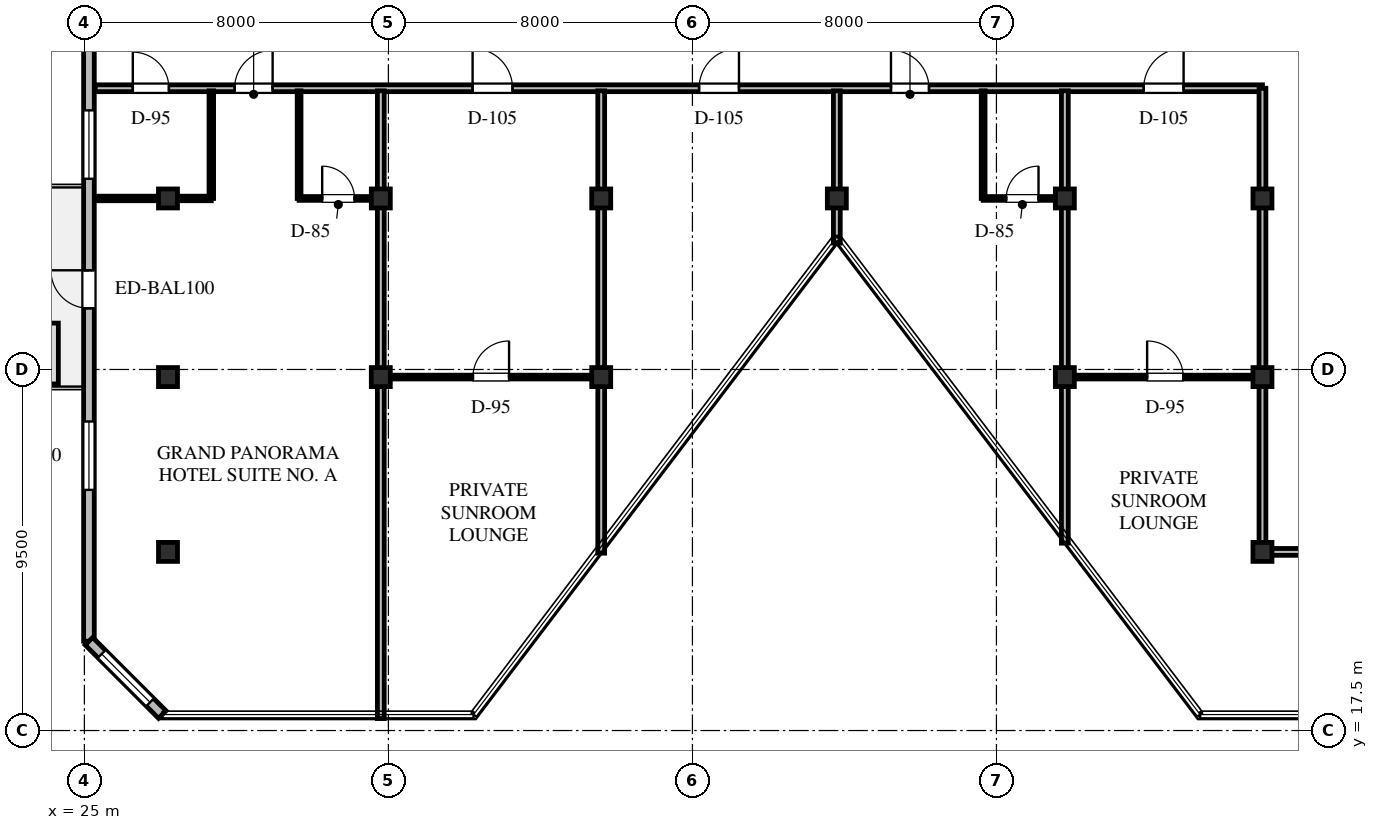
"""IFC4 building model, lengths in metres.
Left out: names, types, materials, properties, quantities, classifications, styles, units other than length and angle.
Written with IfcOpenShell. Run it as: python <this file> out.ifc"""

import sys

from ifc_helpers import new_model, si_unit, direction, frame, frame_2d, origin, origin_2d, place, context, subcontext, project, spatial, rectangle, hollow_rectangle, extrude, element, fill, save


model = new_model("IFC4")
c1 = context("Model", 3, precision=1e-05, world=origin(), true_north=direction((0.0, 1.0)))
c2 = subcontext(c1, "Body", "Model", "MODEL_VIEW")
j1 = project(units=[si_unit("LENGTHUNIT", "METRE"), si_unit("PLANEANGLEUNIT", "RADIAN")], contexts=[c1])
p1 = place(None, origin())
s1 = spatial("IfcSite", under=j1, at=p1, CompositionType="ELEMENT")
p2 = place(p1, origin())
s2 = spatial("IfcBuilding", under=s1, at=p2, CompositionType="ELEMENT")
p3 = place(p2, frame((0.0, 0.0, 256.2)))
s3 = spatial("IfcBuildingStorey", under=s2, at=p3, CompositionType="ELEMENT", Elevation=256.2)
for number, where, z_axis, x_axis in (
    (1, (44.8, 31.5, 0.0), (0.0, 0.0, 1.0), (1.0, 0.0, 0.0)),
    (2, (50.8, 31.5, 0.0), (0.0, 0.0, 1.0), (1.0, 0.0, 0.0)),
    (3, (56.0, 31.5, 0.0), (0.0, 0.0, 1.0), (1.0, 0.0, 0.0)),
    (4, (38.6, 31.5, 0.0), (0.0, 0.0, 1.0), (1.0, 0.0, 0.0)),
    (5, (32.8, 31.5, 0.0), (0.0, 0.0, 1.0), (1.0, 0.0, 0.0)),
    (6, (27.2, 31.5, 0.0), (0.0, 0.0, 1.0), (1.0, 0.0, 0.0)),
    (7, (38.6, 26.8, 0.0), (0.0, 0.0, 1.0), (1.0, 0.0, 0.0)),
    (8, (50.8, 26.8, 0.0), (0.0, 0.0, 1.0), (1.0, 0.0, 0.0)),
    (9, (56.0, 26.8, 0.0), (0.0, 0.0, 1.0), (1.0, 0.0, 0.0)),
    (10, (56.0, 22.2, 0.0), (0.0, 0.0, 1.0), (1.0, 0.0, 0.0)),
    (11, (27.2, 22.2, 0.0), (0.0, 0.0, 1.0), (1.0, 0.0, 0.0)),
    (12, (27.2, 26.8, 0.0), (0.0, 0.0, 1.0), (1.0, 0.0, 0.0)),
    (13, (32.8, 26.8, 0.0), (0.0, 0.0, 1.0), (1.0, 0.0, 0.0)),
):
    element("IfcColumn", number, at=place(p3, frame(where, z_axis=z_axis, x_axis=x_axis)), inside=s3, PredefinedType="COLUMN", context=c2, shape_type="SweptSolid", body=[
        extrude(hollow_rectangle(XDim=0.5, YDim=0.5, WallThickness=0.02, at=origin_2d()), origin(), (0.0, 0.0, 1.0), 3.6),
    ])
p4 = place(p3, frame((25.12, 19.85, 0.0), z_axis=(0.0, 0.0, 1.0), x_axis=(0.0, 1.0, 0.0)))
e14 = element("IfcWall", 14, at=p4, inside=s3, PredefinedType="STANDARD", context=c2, shape_type="SweptSolid", body=[
    extrude(rectangle(XDim=17.95, YDim=0.28, at=frame_2d((8.975, 0.0))), origin(), (0.0, 0.0, 1.0), 3.36),
])
p5 = place(p4, frame((8.76, 0.0, 0.0)))
e15 = element("IfcOpeningElement", 15, at=p5, cuts=e14, PredefinedType="OPENING", context=c2, shape_type="SweptSolid", body=[
    extrude(rectangle(XDim=1.0, YDim=2.15, at=frame_2d((0.5, 1.075))), frame((0.0, 0.15, 0.0), z_axis=(0.0, -1.0, 0.0), x_axis=(1.0, 0.0, 0.0)), (0.0, 0.0, 1.0), 0.3),
])
p6 = place(p4, frame((3.982, 0.0, 0.65)))
e16 = element("IfcOpeningElement", 16, at=p6, cuts=e14, PredefinedType="OPENING", context=c2, shape_type="SweptSolid", body=[
    extrude(rectangle(XDim=1.8, YDim=2.1, at=frame_2d((0.9, 1.05))), frame((0.0, 0.15, 0.0), z_axis=(0.0, -1.0, 0.0), x_axis=(1.0, 0.0, 0.0)), (0.0, 0.0, 1.0), 0.3),
])
p7 = place(p4, frame((12.168, 0.0, 0.65)))
e17 = element("IfcOpeningElement", 17, at=p7, cuts=e14, PredefinedType="OPENING", context=c2, shape_type="SweptSolid", body=[
    extrude(rectangle(XDim=1.8, YDim=2.1, at=frame_2d((0.9, 1.05))), frame((0.0, 0.15, 0.0), z_axis=(0.0, -1.0, 0.0), x_axis=(1.0, 0.0, 0.0)), (0.0, 0.0, 1.0), 0.3),
])
p8 = place(p3, frame((27.05, 17.92, 0.0), z_axis=(0.0, 0.0, 1.0), x_axis=(-0.707106781187, 0.707106781187, 0.0)))
e18 = element("IfcWall", 18, at=p8, inside=s3, PredefinedType="STANDARD", context=c2, shape_type="SweptSolid", body=[
    extrude(rectangle(XDim=2.729, YDim=0.28, at=frame_2d((1.365, 0.0))), origin(), (0.0, 0.0, 1.0), 3.36),
])
p9 = place(p8, frame((0.455, 0.0, 0.65)))
e19 = element("IfcOpeningElement", 19, at=p9, cuts=e18, PredefinedType="OPENING", context=c2, shape_type="SweptSolid", body=[
    extrude(rectangle(XDim=1.8, YDim=2.1, at=frame_2d((0.9, 1.05))), frame((0.0, 0.15, 0.0), z_axis=(0.0, -1.0, 0.0), x_axis=(1.0, 0.0, 0.0)), (0.0, 0.0, 1.0), 0.3),
])
p10 = place(p3, frame((25.285, 34.4, 0.0), z_axis=(0.0, 0.0, 1.0), x_axis=(1.0, 0.0, 0.0)))
e20 = element("IfcWall", 20, at=p10, inside=s3, PredefinedType="STANDARD", context=c2, shape_type="SweptSolid", body=[
    extrude(rectangle(XDim=30.715, YDim=0.18, at=frame_2d((15.357, 0.0))), origin(), (0.0, 0.0, 1.0), 2.664),
])
p11 = place(p10, frame((0.989, 0.0, 0.0)))
e21 = element("IfcOpeningElement", 21, at=p11, cuts=e20, PredefinedType="OPENING", context=c2, shape_type="SweptSolid", body=[
    extrude(rectangle(XDim=0.95, YDim=2.15, at=frame_2d((0.475, 1.075))), frame((0.0, 0.1, 0.0), z_axis=(0.0, -1.0, 0.0), x_axis=(1.0, 0.0, 0.0)), (0.0, 0.0, 1.0), 0.2),
])
p12 = place(p10, frame((3.669, 0.0, 0.0)))
e22 = element("IfcOpeningElement", 22, at=p12, cuts=e20, PredefinedType="OPENING", context=c2, shape_type="SweptSolid", body=[
    extrude(rectangle(XDim=1.0, YDim=2.15, at=frame_2d((0.5, 1.075))), frame((0.0, 0.1, 0.0), z_axis=(0.0, -1.0, 0.0), x_axis=(1.0, 0.0, 0.0)), (0.0, 0.0, 1.0), 0.2),
])
p13 = place(p10, frame((9.931, 0.0, 0.0)))
e23 = element("IfcOpeningElement", 23, at=p13, cuts=e20, PredefinedType="OPENING", context=c2, shape_type="SweptSolid", body=[
    extrude(rectangle(XDim=1.05, YDim=2.2, at=frame_2d((0.525, 1.1))), frame((0.0, 0.1, 0.0), z_axis=(0.0, -1.0, 0.0), x_axis=(1.0, 0.0, 0.0)), (0.0, 0.0, 1.0), 0.2),
])
p14 = place(p10, frame((15.89, 0.0, 0.0)))
e24 = element("IfcOpeningElement", 24, at=p14, cuts=e20, PredefinedType="OPENING", context=c2, shape_type="SweptSolid", body=[
    extrude(rectangle(XDim=1.05, YDim=2.2, at=frame_2d((0.525, 1.1))), frame((0.0, 0.1, 0.0), z_axis=(0.0, -1.0, 0.0), x_axis=(1.0, 0.0, 0.0)), (0.0, 0.0, 1.0), 0.2),
])
p15 = place(p10, frame((20.94, 0.0, 0.0)))
e25 = element("IfcOpeningElement", 25, at=p15, cuts=e20, PredefinedType="OPENING", context=c2, shape_type="SweptSolid", body=[
    extrude(rectangle(XDim=1.0, YDim=2.15, at=frame_2d((0.5, 1.075))), frame((0.0, 0.1, 0.0), z_axis=(0.0, -1.0, 0.0), x_axis=(1.0, 0.0, 0.0)), (0.0, 0.0, 1.0), 0.2),
])
p16 = place(p10, frame((27.59, 0.0, 0.0)))
e26 = element("IfcOpeningElement", 26, at=p16, cuts=e20, PredefinedType="OPENING", context=c2, shape_type="SweptSolid", body=[
    extrude(rectangle(XDim=1.05, YDim=2.2, at=frame_2d((0.525, 1.1))), frame((0.0, 0.1, 0.0), z_axis=(0.0, -1.0, 0.0), x_axis=(1.0, 0.0, 0.0)), (0.0, 0.0, 1.0), 0.2),
])
p17 = place(p3, frame((56.0, 22.2, 0.0), z_axis=(0.0, 0.0, 1.0), x_axis=(0.0, 1.0, 0.0)))
e27 = element("IfcWall", 27, at=p17, inside=s3, PredefinedType="STANDARD", context=c2, shape_type="SweptSolid", body=[
    extrude(rectangle(XDim=12.2, YDim=0.18, at=frame_2d((6.1, 0.0))), origin(), (0.0, 0.0, 1.0), 2.664),
])
p18 = place(p3, frame((56.0, 22.2, 0.0), z_axis=(0.0, 0.0, 1.0), x_axis=(1.0, 0.0, 0.0)))
e28 = element("IfcWall", 28, at=p18, inside=s3, PredefinedType="STANDARD", context=c2, shape_type="SweptSolid", body=[
    extrude(rectangle(XDim=2.0, YDim=0.18, at=frame_2d((1.0, 0.0))), origin(), (0.0, 0.0, 1.0), 2.664),
])
p19 = place(p3, frame((28.34, 31.5, 0.0), z_axis=(0.0, 0.0, 1.0), x_axis=(0.0, 1.0, 0.0)))
e29 = element("IfcWall", 29, at=p19, inside=s3, PredefinedType="PARTITIONING", context=c2, shape_type="SweptSolid", body=[
    extrude(rectangle(XDim=2.832, YDim=0.12, at=frame_2d((1.416, 0.0))), origin(), (0.0, 0.0, 1.0), 2.664),
])
p20 = place(p3, frame((25.285, 31.5, 0.0), z_axis=(0.0, 0.0, 1.0), x_axis=(1.0, 0.0, 0.0)))
e30 = element("IfcWall", 30, at=p20, inside=s3, PredefinedType="PARTITIONING", context=c2, shape_type="SweptSolid", body=[
    extrude(rectangle(XDim=3.055, YDim=0.12, at=frame_2d((1.528, 0.0))), origin(), (0.0, 0.0, 1.0), 2.664),
])
p21 = place(p3, frame((30.65, 31.5, 0.0), z_axis=(0.0, 0.0, 1.0), x_axis=(0.0, 1.0, 0.0)))
e31 = element("IfcWall", 31, at=p21, inside=s3, PredefinedType="PARTITIONING", context=c2, shape_type="SweptSolid", body=[
    extrude(rectangle(XDim=2.832, YDim=0.1, at=frame_2d((1.416, 0.0))), origin(), (0.0, 0.0, 1.0), 2.664),
])
p22 = place(p3, frame((30.65, 31.5, 0.0), z_axis=(0.0, 0.0, 1.0), x_axis=(1.0, 0.0, 0.0)))
e32 = element("IfcWall", 32, at=p22, inside=s3, PredefinedType="PARTITIONING", context=c2, shape_type="SweptSolid", body=[
    extrude(rectangle(XDim=2.082, YDim=0.1, at=frame_2d((1.041, 0.0))), origin(), (0.0, 0.0, 1.0), 2.664),
])
p23 = place(p22, frame((0.607, 0.0, 0.0)))
e33 = element("IfcOpeningElement", 33, at=p23, cuts=e32, PredefinedType="OPENING", context=c2, shape_type="SweptSolid", body=[
    extrude(rectangle(XDim=0.85, YDim=2.1, at=frame_2d((0.425, 1.05))), frame((0.0, 0.06, 0.0), z_axis=(0.0, -1.0, 0.0), x_axis=(1.0, 0.0, 0.0)), (0.0, 0.0, 1.0), 0.12),
])
p24 = place(p3, frame((32.8, 17.815, 0.0), z_axis=(0.0, 0.0, 1.0), x_axis=(0.0, 1.0, 0.0)))
e34 = element("IfcWall", 34, at=p24, inside=s3, PredefinedType="STANDARD", context=c2, shape_type="SweptSolid", body=[
    extrude(rectangle(XDim=16.517, YDim=0.18, at=frame_2d((8.259, 0.0))), origin(), (0.0, 0.0, 1.0), 2.664),
])
p25 = place(p3, frame((32.868, 26.8, 0.0), z_axis=(0.0, 0.0, 1.0), x_axis=(1.0, 0.0, 0.0)))
e35 = element("IfcWall", 35, at=p25, inside=s3, PredefinedType="PARTITIONING", context=c2, shape_type="SweptSolid", body=[
    extrude(rectangle(XDim=5.664, YDim=0.1, at=frame_2d((2.832, 0.0))), origin(), (0.0, 0.0, 1.0), 2.664),
])
p26 = place(p25, frame((2.357, 0.0, 0.0)))
e36 = element("IfcOpeningElement", 36, at=p26, cuts=e35, PredefinedType="OPENING", context=c2, shape_type="SweptSolid", body=[
    extrude(rectangle(XDim=0.95, YDim=2.15, at=frame_2d((0.475, 1.075))), frame((0.0, 0.06, 0.0), z_axis=(0.0, -1.0, 0.0), x_axis=(1.0, 0.0, 0.0)), (0.0, 0.0, 1.0), 0.12),
])
p27 = place(p3, frame((38.6, 22.167, 0.0), z_axis=(0.0, 0.0, 1.0), x_axis=(0.0, 1.0, 0.0)))
e37 = element("IfcWall", 37, at=p27, inside=s3, PredefinedType="STANDARD", context=c2, shape_type="SweptSolid", body=[
    extrude(rectangle(XDim=12.165, YDim=0.18, at=frame_2d((6.083, 0.0))), origin(), (0.0, 0.0, 1.0), 2.664),
])
p28 = place(p3, frame((44.8, 30.325, 0.0), z_axis=(0.0, 0.0, 1.0), x_axis=(0.0, 1.0, 0.0)))
e38 = element("IfcWall", 38, at=p28, inside=s3, PredefinedType="STANDARD", context=c2, shape_type="SweptSolid", body=[
    extrude(rectangle(XDim=4.007, YDim=0.18, at=frame_2d((2.004, 0.0))), origin(), (0.0, 0.0, 1.0), 2.664),
])
p29 = place(p3, frame((48.65, 31.5, 0.0), z_axis=(0.0, 0.0, 1.0), x_axis=(0.0, 1.0, 0.0)))
e39 = element("IfcWall", 39, at=p29, inside=s3, PredefinedType="PARTITIONING", context=c2, shape_type="SweptSolid", body=[
    extrude(rectangle(XDim=2.832, YDim=0.1, at=frame_2d((1.416, 0.0))), origin(), (0.0, 0.0, 1.0), 2.664),
])
p30 = place(p3, frame((48.65, 31.5, 0.0), z_axis=(0.0, 0.0, 1.0), x_axis=(1.0, 0.0, 0.0)))
e40 = element("IfcWall", 40, at=p30, inside=s3, PredefinedType="PARTITIONING", context=c2, shape_type="SweptSolid", body=[
    extrude(rectangle(XDim=2.082, YDim=0.1, at=frame_2d((1.041, 0.0))), origin(), (0.0, 0.0, 1.0), 2.664),
])
p31 = place(p30, frame((0.607, 0.0, 0.0)))
e41 = element("IfcOpeningElement", 41, at=p31, cuts=e40, PredefinedType="OPENING", context=c2, shape_type="SweptSolid", body=[
    extrude(rectangle(XDim=0.85, YDim=2.1, at=frame_2d((0.425, 1.05))), frame((0.0, 0.06, 0.0), z_axis=(0.0, -1.0, 0.0), x_axis=(1.0, 0.0, 0.0)), (0.0, 0.0, 1.0), 0.12),
])
p32 = place(p3, frame((50.8, 22.43, 0.0), z_axis=(0.0, 0.0, 1.0), x_axis=(0.0, 1.0, 0.0)))
e42 = element("IfcWall", 42, at=p32, inside=s3, PredefinedType="STANDARD", context=c2, shape_type="SweptSolid", body=[
    extrude(rectangle(XDim=11.902, YDim=0.18, at=frame_2d((5.951, 0.0))), origin(), (0.0, 0.0, 1.0), 2.664),
])
p33 = place(p3, frame((50.868, 26.8, 0.0), z_axis=(0.0, 0.0, 1.0), x_axis=(1.0, 0.0, 0.0)))
e43 = element("IfcWall", 43, at=p33, inside=s3, PredefinedType="PARTITIONING", context=c2, shape_type="SweptSolid", body=[
    extrude(rectangle(XDim=5.064, YDim=0.1, at=frame_2d((2.532, 0.0))), origin(), (0.0, 0.0, 1.0), 2.664),
])
p34 = place(p33, frame((2.097, 0.0, 0.0)))
e44 = element("IfcOpeningElement", 44, at=p34, cuts=e43, PredefinedType="OPENING", context=c2, shape_type="SweptSolid", body=[
    extrude(rectangle(XDim=0.95, YDim=2.15, at=frame_2d((0.475, 1.075))), frame((0.0, 0.06, 0.0), z_axis=(0.0, -1.0, 0.0), x_axis=(1.0, 0.0, 0.0)), (0.0, 0.0, 1.0), 0.12),
])
p35 = place(p5, origin())
e45 = element("IfcDoor", 45, at=p35, inside=s3, OperationType="SINGLE_SWING_RIGHT", PredefinedType="DOOR", context=c2, shape_type="SweptSolid", body=[
    extrude(rectangle(XDim=1.0, YDim=2.15, at=frame_2d((0.5, 1.075))), frame((0.0, 0.025, 0.0), z_axis=(0.0, -1.0, 0.0), x_axis=(1.0, 0.0, 0.0)), (0.0, 0.0, 1.0), 0.05),
])
fill(e15, e45)
p36 = place(p6, origin())
e46 = element("IfcWindow", 46, at=p36, inside=s3, PartitioningType="SINGLE_PANEL", PredefinedType="WINDOW", context=c2, shape_type="SweptSolid", body=[
    extrude(rectangle(XDim=1.8, YDim=2.1, at=frame_2d((0.9, 1.05))), frame((0.0, 0.03, 0.0), z_axis=(0.0, -1.0, 0.0), x_axis=(1.0, 0.0, 0.0)), (0.0, 0.0, 1.0), 0.06),
])
fill(e16, e46)
p37 = place(p7, origin())
e47 = element("IfcWindow", 47, at=p37, inside=s3, PartitioningType="SINGLE_PANEL", PredefinedType="WINDOW", context=c2, shape_type="SweptSolid", body=[
    extrude(rectangle(XDim=1.8, YDim=2.1, at=frame_2d((0.9, 1.05))), frame((0.0, 0.03, 0.0), z_axis=(0.0, -1.0, 0.0), x_axis=(1.0, 0.0, 0.0)), (0.0, 0.0, 1.0), 0.06),
])
fill(e17, e47)
p38 = place(p9, origin())
e48 = element("IfcWindow", 48, at=p38, inside=s3, PartitioningType="SINGLE_PANEL", PredefinedType="WINDOW", context=c2, shape_type="SweptSolid", body=[
    extrude(rectangle(XDim=1.8, YDim=2.1, at=frame_2d((0.9, 1.05))), frame((0.0, 0.03, 0.0), z_axis=(0.0, -1.0, 0.0), x_axis=(1.0, 0.0, 0.0)), (0.0, 0.0, 1.0), 0.06),
])
fill(e19, e48)
p39 = place(p11, origin())
e49 = element("IfcDoor", 49, at=p39, inside=s3, OperationType="SINGLE_SWING_LEFT", PredefinedType="DOOR", context=c2, shape_type="SweptSolid", body=[
    extrude(rectangle(XDim=0.95, YDim=2.15, at=frame_2d((0.475, 1.075))), frame((0.0, 0.025, 0.0), z_axis=(0.0, -1.0, 0.0), x_axis=(1.0, 0.0, 0.0)), (0.0, 0.0, 1.0), 0.05),
])
fill(e21, e49)
p40 = place(p12, origin())
e50 = element("IfcDoor", 50, at=p40, inside=s3, OperationType="SINGLE_SWING_RIGHT", PredefinedType="DOOR", context=c2, shape_type="SweptSolid", body=[
    extrude(rectangle(XDim=1.0, YDim=2.15, at=frame_2d((0.5, 1.075))), frame((0.0, 0.025, 0.0), z_axis=(0.0, -1.0, 0.0), x_axis=(1.0, 0.0, 0.0)), (0.0, 0.0, 1.0), 0.05),
])
fill(e22, e50)
p41 = place(p23, origin())
e51 = element("IfcDoor", 51, at=p41, inside=s3, OperationType="SINGLE_SWING_LEFT", PredefinedType="DOOR", context=c2, shape_type="SweptSolid", body=[
    extrude(rectangle(XDim=0.85, YDim=2.1, at=frame_2d((0.425, 1.05))), frame((0.0, 0.025, 0.0), z_axis=(0.0, -1.0, 0.0), x_axis=(1.0, 0.0, 0.0)), (0.0, 0.0, 1.0), 0.05),
])
fill(e33, e51)
p42 = place(p26, origin())
e52 = element("IfcDoor", 52, at=p42, inside=s3, OperationType="SINGLE_SWING_RIGHT", PredefinedType="DOOR", context=c2, shape_type="SweptSolid", body=[
    extrude(rectangle(XDim=0.95, YDim=2.15, at=frame_2d((0.475, 1.075))), frame((0.0, 0.025, 0.0), z_axis=(0.0, -1.0, 0.0), x_axis=(1.0, 0.0, 0.0)), (0.0, 0.0, 1.0), 0.05),
])
fill(e36, e52)
p43 = place(p13, origin())
e53 = element("IfcDoor", 53, at=p43, inside=s3, OperationType="SINGLE_SWING_LEFT", PredefinedType="DOOR", context=c2, shape_type="SweptSolid", body=[
    extrude(rectangle(XDim=1.05, YDim=2.2, at=frame_2d((0.525, 1.1))), frame((0.0, 0.025, 0.0), z_axis=(0.0, -1.0, 0.0), x_axis=(1.0, 0.0, 0.0)), (0.0, 0.0, 1.0), 0.05),
])
fill(e23, e53)
p44 = place(p14, origin())
e54 = element("IfcDoor", 54, at=p44, inside=s3, OperationType="SINGLE_SWING_RIGHT", PredefinedType="DOOR", context=c2, shape_type="SweptSolid", body=[
    extrude(rectangle(XDim=1.05, YDim=2.2, at=frame_2d((0.525, 1.1))), frame((0.0, 0.025, 0.0), z_axis=(0.0, -1.0, 0.0), x_axis=(1.0, 0.0, 0.0)), (0.0, 0.0, 1.0), 0.05),
])
fill(e24, e54)
p45 = place(p15, origin())
e55 = element("IfcDoor", 55, at=p45, inside=s3, OperationType="SINGLE_SWING_LEFT", PredefinedType="DOOR", context=c2, shape_type="SweptSolid", body=[
    extrude(rectangle(XDim=1.0, YDim=2.15, at=frame_2d((0.5, 1.075))), frame((0.0, 0.025, 0.0), z_axis=(0.0, -1.0, 0.0), x_axis=(1.0, 0.0, 0.0)), (0.0, 0.0, 1.0), 0.05),
])
fill(e25, e55)
p46 = place(p31, origin())
e56 = element("IfcDoor", 56, at=p46, inside=s3, OperationType="SINGLE_SWING_RIGHT", PredefinedType="DOOR", context=c2, shape_type="SweptSolid", body=[
    extrude(rectangle(XDim=0.85, YDim=2.1, at=frame_2d((0.425, 1.05))), frame((0.0, 0.025, 0.0), z_axis=(0.0, -1.0, 0.0), x_axis=(1.0, 0.0, 0.0)), (0.0, 0.0, 1.0), 0.05),
])
fill(e41, e56)
p47 = place(p34, origin())
e57 = element("IfcDoor", 57, at=p47, inside=s3, OperationType="SINGLE_SWING_LEFT", PredefinedType="DOOR", context=c2, shape_type="SweptSolid", body=[
    extrude(rectangle(XDim=0.95, YDim=2.15, at=frame_2d((0.475, 1.075))), frame((0.0, 0.025, 0.0), z_axis=(0.0, -1.0, 0.0), x_axis=(1.0, 0.0, 0.0)), (0.0, 0.0, 1.0), 0.05),
])
fill(e44, e57)
p48 = place(p16, origin())
e58 = element("IfcDoor", 58, at=p48, inside=s3, OperationType="SINGLE_SWING_RIGHT", PredefinedType="DOOR", context=c2, shape_type="SweptSolid", body=[
    extrude(rectangle(XDim=1.05, YDim=2.2, at=frame_2d((0.525, 1.1))), frame((0.0, 0.025, 0.0), z_axis=(0.0, -1.0, 0.0), x_axis=(1.0, 0.0, 0.0)), (0.0, 0.0, 1.0), 0.05),
])
fill(e26, e58)
save(model, sys.argv[1])
